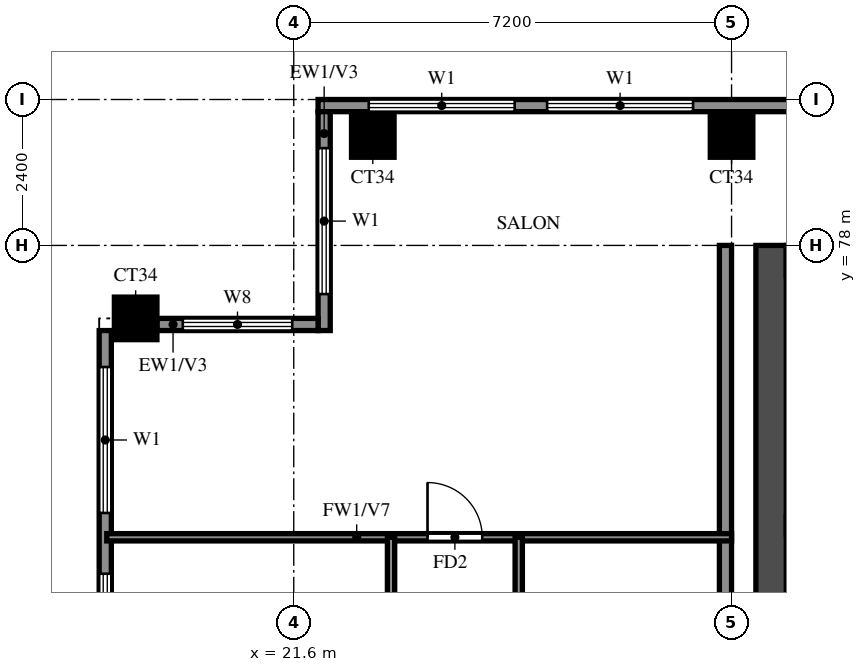
"""IFC4 building model, lengths in metres.
Left out: names, types, materials, properties, quantities, classifications, styles, units other than length and angle.
Written with IfcOpenShell. Run it as: python <this file> out.ifc"""

import sys

from ifc_helpers import new_model, si_unit, direction, frame, frame_2d, origin, origin_2d, place, context, subcontext, project, spatial, rectangle, extrude, source, transform, mapped, element, fill, save


model = new_model("IFC4")
c1 = context("Model", 3, precision=1e-05, world=origin(), true_north=direction((0.0, 1.0)))
c2 = subcontext(c1, "Body", "Model", "MODEL_VIEW")
j1 = project(units=[si_unit("LENGTHUNIT", "METRE"), si_unit("PLANEANGLEUNIT", "RADIAN")], contexts=[c1])
p1 = place(None, origin())
s1 = spatial("IfcSite", under=j1, at=p1, CompositionType="ELEMENT")
p2 = place(p1, origin())
s2 = spatial("IfcBuilding", under=s1, at=p2, CompositionType="ELEMENT")
p3 = place(p2, frame((0.0, 0.0, 229.0)))
s3 = spatial("IfcBuildingStorey", under=s2, at=p3, CompositionType="ELEMENT", Elevation=229.0)
m1 = source(origin(), c2, "Body", "SweptSolid", [
    extrude(rectangle(XDim=0.7, YDim=0.7, at=origin_2d()), origin(), (0.0, 0.0, 1.0), 3.22),
])
for number, where, z_axis, x_axis in (
    (1, (19.0, 76.8, 0.0), (0.0, 0.0, 1.0), (1.0, 0.0, 0.0)),
    (2, (22.9, 79.8, 0.0), (0.0, 0.0, 1.0), (1.0, 0.0, 0.0)),
    (3, (28.8, 79.8, 0.0), (0.0, 0.0, 1.0), (1.0, 0.0, 0.0)),
):
    element("IfcColumn", number, at=place(p3, frame(where, z_axis=z_axis, x_axis=x_axis)), inside=s3, PredefinedType="COLUMN", context=c2, shape_type="MappedRepresentation", body=[
        mapped(m1, transform((0.0, 0.0, 0.0))),
    ])
p4 = place(p3, frame((29.45, 66.15, 0.0), z_axis=(0.0, 0.0, 1.0), x_axis=(0.0, 1.0, 0.0)))
e4 = element("IfcWall", 4, at=p4, inside=s3, PredefinedType="SHEAR", context=c2, shape_type="SweptSolid", body=[
    extrude(rectangle(XDim=11.85, YDim=0.5, at=frame_2d((5.925, 0.0))), origin(), (0.0, 0.0, 1.0), 3.22),
])
p5 = place(p3, frame((78.6, 80.3, 0.0), z_axis=(0.0, 0.0, 1.0), x_axis=(-1.0, 0.0, 0.0)))
e5 = element("IfcWall", 5, at=p5, inside=s3, PredefinedType="SOLIDWALL", context=c2, shape_type="SweptSolid", body=[
    extrude(rectangle(XDim=56.6, YDim=0.2, at=frame_2d((28.3, 0.0))), origin(), (0.0, 0.0, 1.0), 3.22),
])
p6 = place(p5, frame((50.433, 0.0, 0.6)))
e6 = element("IfcOpeningElement", 6, at=p6, cuts=e5, PredefinedType="OPENING", context=c2, shape_type="SweptSolid", body=[
    extrude(rectangle(XDim=2.4, YDim=2.4, at=frame_2d((1.2, 1.2))), frame((0.0, 0.11, 0.0), z_axis=(0.0, -1.0, 0.0), x_axis=(1.0, 0.0, 0.0)), (0.0, 0.0, 1.0), 0.22),
])
p7 = place(p5, frame((53.367, 0.0, 0.6)))
e7 = element("IfcOpeningElement", 7, at=p7, cuts=e5, PredefinedType="OPENING", context=c2, shape_type="SweptSolid", body=[
    extrude(rectangle(XDim=2.4, YDim=2.4, at=frame_2d((1.2, 1.2))), frame((0.0, 0.11, 0.0), z_axis=(0.0, -1.0, 0.0), x_axis=(1.0, 0.0, 0.0)), (0.0, 0.0, 1.0), 0.22),
])
p8 = place(p5, frame((0.767, 0.0, 0.6)))
e8 = element("IfcOpeningElement", 8, at=p8, cuts=e5, PredefinedType="OPENING", context=c2, shape_type="SweptSolid", body=[
    extrude(rectangle(XDim=2.4, YDim=2.4, at=frame_2d((1.2, 1.2))), frame((0.0, 0.11, 0.0), z_axis=(0.0, -1.0, 0.0), x_axis=(1.0, 0.0, 0.0)), (0.0, 0.0, 1.0), 0.22),
])
p9 = place(p5, frame((3.633, 0.0, 0.6)))
e9 = element("IfcOpeningElement", 9, at=p9, cuts=e5, PredefinedType="OPENING", context=c2, shape_type="SweptSolid", body=[
    extrude(rectangle(XDim=2.4, YDim=2.4, at=frame_2d((1.2, 1.2))), frame((0.0, 0.11, 0.0), z_axis=(0.0, -1.0, 0.0), x_axis=(1.0, 0.0, 0.0)), (0.0, 0.0, 1.0), 0.22),
])
p10 = place(p3, frame((22.1, 80.2, 0.0), z_axis=(0.0, 0.0, 1.0), x_axis=(0.0, -1.0, 0.0)))
e10 = element("IfcWall", 10, at=p10, inside=s3, PredefinedType="SOLIDWALL", context=c2, shape_type="SweptSolid", body=[
    extrude(rectangle(XDim=3.6, YDim=0.2, at=frame_2d((1.8, 0.0))), origin(), (0.0, 0.0, 1.0), 3.22),
])
p11 = place(p10, frame((0.6, 0.0, 0.6)))
e11 = element("IfcOpeningElement", 11, at=p11, cuts=e10, PredefinedType="OPENING", context=c2, shape_type="SweptSolid", body=[
    extrude(rectangle(XDim=2.4, YDim=2.4, at=frame_2d((1.2, 1.2))), frame((0.0, 0.11, 0.0), z_axis=(0.0, -1.0, 0.0), x_axis=(1.0, 0.0, 0.0)), (0.0, 0.0, 1.0), 0.22),
])
p12 = place(p3, frame((22.0, 76.7, 0.0), z_axis=(0.0, 0.0, 1.0), x_axis=(-1.0, 0.0, 0.0)))
e12 = element("IfcWall", 12, at=p12, inside=s3, PredefinedType="SOLIDWALL", context=c2, shape_type="SweptSolid", body=[
    extrude(rectangle(XDim=2.65, YDim=0.2, at=frame_2d((1.325, 0.0))), origin(), (0.0, 0.0, 1.0), 3.22),
])
p13 = place(p12, frame((0.425, 0.0, 0.6)))
e13 = element("IfcOpeningElement", 13, at=p13, cuts=e12, PredefinedType="OPENING", context=c2, shape_type="SweptSolid", body=[
    extrude(rectangle(XDim=1.8, YDim=2.4, at=frame_2d((0.9, 1.2))), frame((0.0, 0.11, 0.0), z_axis=(0.0, -1.0, 0.0), x_axis=(1.0, 0.0, 0.0)), (0.0, 0.0, 1.0), 0.22),
])
p14 = place(p3, frame((18.5, 76.6, 0.0), z_axis=(0.0, 0.0, 1.0), x_axis=(0.0, -1.0, 0.0)))
e14 = element("IfcWall", 14, at=p14, inside=s3, PredefinedType="SOLIDWALL", context=c2, shape_type="SweptSolid", body=[
    extrude(rectangle(XDim=33.4, YDim=0.2, at=frame_2d((16.7, 0.0))), origin(), (0.0, 0.0, 1.0), 3.22),
])
p15 = place(p14, frame((11.5, 0.0, 0.0)))
e15 = element("IfcOpeningElement", 15, at=p15, cuts=e14, PredefinedType="OPENING", context=c2, shape_type="SweptSolid", body=[
    extrude(rectangle(XDim=1.8, YDim=2.4, at=frame_2d((0.9, 1.2))), frame((0.0, 0.11, 0.0), z_axis=(0.0, -1.0, 0.0), x_axis=(1.0, 0.0, 0.0)), (0.0, 0.0, 1.0), 0.22),
])
p16 = place(p14, frame((25.9, 0.0, 0.0)))
e16 = element("IfcOpeningElement", 16, at=p16, cuts=e14, PredefinedType="OPENING", context=c2, shape_type="SweptSolid", body=[
    extrude(rectangle(XDim=1.8, YDim=2.4, at=frame_2d((0.9, 1.2))), frame((0.0, 0.11, 0.0), z_axis=(0.0, -1.0, 0.0), x_axis=(1.0, 0.0, 0.0)), (0.0, 0.0, 1.0), 0.22),
])
p17 = place(p14, frame((28.9, 0.0, 0.6)))
e17 = element("IfcOpeningElement", 17, at=p17, cuts=e14, PredefinedType="OPENING", context=c2, shape_type="SweptSolid", body=[
    extrude(rectangle(XDim=1.2, YDim=2.4, at=frame_2d((0.6, 1.2))), frame((0.0, 0.11, 0.0), z_axis=(0.0, -1.0, 0.0), x_axis=(1.0, 0.0, 0.0)), (0.0, 0.0, 1.0), 0.22),
])
p18 = place(p14, frame((31.2, 0.0, 0.6)))
e18 = element("IfcOpeningElement", 18, at=p18, cuts=e14, PredefinedType="OPENING", context=c2, shape_type="SweptSolid", body=[
    extrude(rectangle(XDim=1.8, YDim=2.4, at=frame_2d((0.9, 1.2))), frame((0.0, 0.11, 0.0), z_axis=(0.0, -1.0, 0.0), x_axis=(1.0, 0.0, 0.0)), (0.0, 0.0, 1.0), 0.22),
])
p19 = place(p14, frame((21.7, 0.0, 0.6)))
e19 = element("IfcOpeningElement", 19, at=p19, cuts=e14, PredefinedType="OPENING", context=c2, shape_type="SweptSolid", body=[
    extrude(rectangle(XDim=1.8, YDim=2.4, at=frame_2d((0.9, 1.2))), frame((0.0, 0.11, 0.0), z_axis=(0.0, -1.0, 0.0), x_axis=(1.0, 0.0, 0.0)), (0.0, 0.0, 1.0), 0.22),
])
p20 = place(p14, frame((14.5, 0.0, 0.6)))
e20 = element("IfcOpeningElement", 20, at=p20, cuts=e14, PredefinedType="OPENING", context=c2, shape_type="SweptSolid", body=[
    extrude(rectangle(XDim=1.2, YDim=2.4, at=frame_2d((0.6, 1.2))), frame((0.0, 0.11, 0.0), z_axis=(0.0, -1.0, 0.0), x_axis=(1.0, 0.0, 0.0)), (0.0, 0.0, 1.0), 0.22),
])
p21 = place(p14, frame((17.8, 0.0, 0.6)))
e21 = element("IfcOpeningElement", 21, at=p21, cuts=e14, PredefinedType="OPENING", context=c2, shape_type="SweptSolid", body=[
    extrude(rectangle(XDim=2.4, YDim=2.4, at=frame_2d((1.2, 1.2))), frame((0.0, 0.11, 0.0), z_axis=(0.0, -1.0, 0.0), x_axis=(1.0, 0.0, 0.0)), (0.0, 0.0, 1.0), 0.22),
])
p22 = place(p14, frame((7.3, 0.0, 0.6)))
e22 = element("IfcOpeningElement", 22, at=p22, cuts=e14, PredefinedType="OPENING", context=c2, shape_type="SweptSolid", body=[
    extrude(rectangle(XDim=1.8, YDim=2.4, at=frame_2d((0.9, 1.2))), frame((0.0, 0.11, 0.0), z_axis=(0.0, -1.0, 0.0), x_axis=(1.0, 0.0, 0.0)), (0.0, 0.0, 1.0), 0.22),
])
p23 = place(p14, frame((4.0, 0.0, 0.6)))
e23 = element("IfcOpeningElement", 23, at=p23, cuts=e14, PredefinedType="OPENING", context=c2, shape_type="SweptSolid", body=[
    extrude(rectangle(XDim=2.4, YDim=2.4, at=frame_2d((1.2, 1.2))), frame((0.0, 0.11, 0.0), z_axis=(0.0, -1.0, 0.0), x_axis=(1.0, 0.0, 0.0)), (0.0, 0.0, 1.0), 0.22),
])
p24 = place(p14, frame((0.6, 0.0, 0.6)))
e24 = element("IfcOpeningElement", 24, at=p24, cuts=e14, PredefinedType="OPENING", context=c2, shape_type="SweptSolid", body=[
    extrude(rectangle(XDim=2.4, YDim=2.4, at=frame_2d((1.2, 1.2))), frame((0.0, 0.11, 0.0), z_axis=(0.0, -1.0, 0.0), x_axis=(1.0, 0.0, 0.0)), (0.0, 0.0, 1.0), 0.22),
])
p25 = place(p3, frame((28.7, 62.4, 0.0), z_axis=(0.0, 0.0, 1.0), x_axis=(0.0, 1.0, 0.0)))
e25 = element("IfcWall", 25, at=p25, inside=s3, PredefinedType="SOLIDWALL", context=c2, shape_type="SweptSolid", body=[
    extrude(rectangle(XDim=15.6, YDim=0.2, at=frame_2d((7.8, 0.0))), origin(), (0.0, 0.0, 1.0), 3.22),
])
p26 = place(p3, frame((18.525, 73.2, 0.0), z_axis=(0.0, 0.0, 1.0), x_axis=(1.0, 0.0, 0.0)))
e26 = element("IfcWall", 26, at=p26, inside=s3, PredefinedType="PARTITIONING", context=c2, shape_type="SweptSolid", body=[
    extrude(rectangle(XDim=10.275, YDim=0.12, at=frame_2d((5.138, 0.0))), origin(), (0.0, 0.0, 1.0), 2.32),
])
p27 = place(p26, frame((5.275, 0.0, 0.0)))
e27 = element("IfcOpeningElement", 27, at=p27, cuts=e26, PredefinedType="OPENING", context=c2, shape_type="SweptSolid", body=[
    extrude(rectangle(XDim=0.9, YDim=2.1, at=frame_2d((0.45, 1.05))), frame((0.0, 0.07, 0.0), z_axis=(0.0, -1.0, 0.0), x_axis=(1.0, 0.0, 0.0)), (0.0, 0.0, 1.0), 0.14),
])
p28 = place(p3, frame((23.2, 48.0, 0.0), z_axis=(0.0, 0.0, 1.0), x_axis=(0.0, 1.0, 0.0)))
e28 = element("IfcWall", 28, at=p28, inside=s3, PredefinedType="PARTITIONING", context=c2, shape_type="SweptSolid", body=[
    extrude(rectangle(XDim=25.2, YDim=0.12, at=frame_2d((12.6, 0.0))), origin(), (0.0, 0.0, 1.0), 3.22),
])
p29 = place(p28, frame((1.35, 0.0, 0.0)))
e29 = element("IfcOpeningElement", 29, at=p29, cuts=e28, PredefinedType="OPENING", context=c2, shape_type="SweptSolid", body=[
    extrude(rectangle(XDim=0.9, YDim=2.1, at=frame_2d((0.45, 1.05))), frame((0.0, 0.07, 0.0), z_axis=(0.0, -1.0, 0.0), x_axis=(1.0, 0.0, 0.0)), (0.0, 0.0, 1.0), 0.14),
])
p30 = place(p28, frame((4.95, 0.0, 0.0)))
e30 = element("IfcOpeningElement", 30, at=p30, cuts=e28, PredefinedType="OPENING", context=c2, shape_type="SweptSolid", body=[
    extrude(rectangle(XDim=0.9, YDim=2.1, at=frame_2d((0.45, 1.05))), frame((0.0, 0.07, 0.0), z_axis=(0.0, -1.0, 0.0), x_axis=(1.0, 0.0, 0.0)), (0.0, 0.0, 1.0), 0.14),
])
p31 = place(p28, frame((10.05, 0.0, 0.0)))
e31 = element("IfcOpeningElement", 31, at=p31, cuts=e28, PredefinedType="OPENING", context=c2, shape_type="SweptSolid", body=[
    extrude(rectangle(XDim=1.5, YDim=2.1, at=frame_2d((0.75, 1.05))), frame((0.0, 0.07, 0.0), z_axis=(0.0, -1.0, 0.0), x_axis=(1.0, 0.0, 0.0)), (0.0, 0.0, 1.0), 0.14),
])
p32 = place(p28, frame((15.75, 0.0, 0.0)))
e32 = element("IfcOpeningElement", 32, at=p32, cuts=e28, PredefinedType="OPENING", context=c2, shape_type="SweptSolid", body=[
    extrude(rectangle(XDim=0.9, YDim=2.1, at=frame_2d((0.45, 1.05))), frame((0.0, 0.07, 0.0), z_axis=(0.0, -1.0, 0.0), x_axis=(1.0, 0.0, 0.0)), (0.0, 0.0, 1.0), 0.14),
])
p33 = place(p28, frame((19.35, 0.0, 0.0)))
e33 = element("IfcOpeningElement", 33, at=p33, cuts=e28, PredefinedType="OPENING", context=c2, shape_type="SweptSolid", body=[
    extrude(rectangle(XDim=0.9, YDim=2.1, at=frame_2d((0.45, 1.05))), frame((0.0, 0.07, 0.0), z_axis=(0.0, -1.0, 0.0), x_axis=(1.0, 0.0, 0.0)), (0.0, 0.0, 1.0), 0.14),
])
p34 = place(p28, frame((22.95, 0.0, 0.0)))
e34 = element("IfcOpeningElement", 34, at=p34, cuts=e28, PredefinedType="OPENING", context=c2, shape_type="SweptSolid", body=[
    extrude(rectangle(XDim=0.9, YDim=2.1, at=frame_2d((0.45, 1.05))), frame((0.0, 0.07, 0.0), z_axis=(0.0, -1.0, 0.0), x_axis=(1.0, 0.0, 0.0)), (0.0, 0.0, 1.0), 0.14),
])
p35 = place(p3, frame((25.3, 64.8, 0.0), z_axis=(0.0, 0.0, 1.0), x_axis=(0.0, 1.0, 0.0)))
e35 = element("IfcWall", 35, at=p35, inside=s3, PredefinedType="PARTITIONING", context=c2, shape_type="SweptSolid", body=[
    extrude(rectangle(XDim=8.4, YDim=0.12, at=frame_2d((4.2, 0.0))), origin(), (0.0, 0.0, 1.0), 3.22),
])
p36 = place(p35, frame((4.975, 0.0, 0.0)))
e36 = element("IfcOpeningElement", 36, at=p36, cuts=e35, PredefinedType="OPENING", context=c2, shape_type="SweptSolid", body=[
    extrude(rectangle(XDim=0.9, YDim=2.1, at=frame_2d((0.45, 1.05))), frame((0.0, 0.07, 0.0), z_axis=(0.0, -1.0, 0.0), x_axis=(1.0, 0.0, 0.0)), (0.0, 0.0, 1.0), 0.14),
])
p37 = place(p6, origin())
e37 = element("IfcWindow", 37, at=p37, inside=s3, PartitioningType="DOUBLE_PANEL_VERTICAL", PredefinedType="WINDOW", context=c2, shape_type="SweptSolid", body=[
    extrude(rectangle(XDim=2.4, YDim=2.4, at=frame_2d((1.2, 1.2))), frame((0.0, 0.03, 0.0), z_axis=(0.0, -1.0, 0.0), x_axis=(1.0, 0.0, 0.0)), (0.0, 0.0, 1.0), 0.06),
])
fill(e6, e37)
p38 = place(p7, origin())
e38 = element("IfcWindow", 38, at=p38, inside=s3, PartitioningType="DOUBLE_PANEL_VERTICAL", PredefinedType="WINDOW", context=c2, shape_type="SweptSolid", body=[
    extrude(rectangle(XDim=2.4, YDim=2.4, at=frame_2d((1.2, 1.2))), frame((0.0, 0.03, 0.0), z_axis=(0.0, -1.0, 0.0), x_axis=(1.0, 0.0, 0.0)), (0.0, 0.0, 1.0), 0.06),
])
fill(e7, e38)
p39 = place(p11, origin())
e39 = element("IfcWindow", 39, at=p39, inside=s3, PartitioningType="DOUBLE_PANEL_VERTICAL", PredefinedType="WINDOW", context=c2, shape_type="SweptSolid", body=[
    extrude(rectangle(XDim=2.4, YDim=2.4, at=frame_2d((1.2, 1.2))), frame((0.0, 0.03, 0.0), z_axis=(0.0, -1.0, 0.0), x_axis=(1.0, 0.0, 0.0)), (0.0, 0.0, 1.0), 0.06),
])
fill(e11, e39)
p40 = place(p13, origin())
e40 = element("IfcWindow", 40, at=p40, inside=s3, PartitioningType="DOUBLE_PANEL_VERTICAL", PredefinedType="WINDOW", context=c2, shape_type="SweptSolid", body=[
    extrude(rectangle(XDim=1.8, YDim=2.4, at=frame_2d((0.9, 1.2))), frame((0.0, 0.03, 0.0), z_axis=(0.0, -1.0, 0.0), x_axis=(1.0, 0.0, 0.0)), (0.0, 0.0, 1.0), 0.06),
])
fill(e13, e40)
p41 = place(p23, origin())
e41 = element("IfcWindow", 41, at=p41, inside=s3, PartitioningType="DOUBLE_PANEL_VERTICAL", PredefinedType="WINDOW", context=c2, shape_type="SweptSolid", body=[
    extrude(rectangle(XDim=2.4, YDim=2.4, at=frame_2d((1.2, 1.2))), frame((0.0, 0.03, 0.0), z_axis=(0.0, -1.0, 0.0), x_axis=(1.0, 0.0, 0.0)), (0.0, 0.0, 1.0), 0.06),
])
fill(e23, e41)
p42 = place(p24, origin())
e42 = element("IfcWindow", 42, at=p42, inside=s3, PartitioningType="DOUBLE_PANEL_VERTICAL", PredefinedType="WINDOW", context=c2, shape_type="SweptSolid", body=[
    extrude(rectangle(XDim=2.4, YDim=2.4, at=frame_2d((1.2, 1.2))), frame((0.0, 0.03, 0.0), z_axis=(0.0, -1.0, 0.0), x_axis=(1.0, 0.0, 0.0)), (0.0, 0.0, 1.0), 0.06),
])
fill(e24, e42)
p43 = place(p27, origin())
e43 = element("IfcDoor", 43, at=p43, inside=s3, OperationType="SINGLE_SWING_LEFT", PredefinedType="DOOR", context=c2, shape_type="SweptSolid", body=[
    extrude(rectangle(XDim=0.9, YDim=2.1, at=frame_2d((0.45, 1.05))), frame((0.0, 0.025, 0.0), z_axis=(0.0, -1.0, 0.0), x_axis=(1.0, 0.0, 0.0)), (0.0, 0.0, 1.0), 0.05),
])
fill(e27, e43)
save(model, sys.argv[1])
